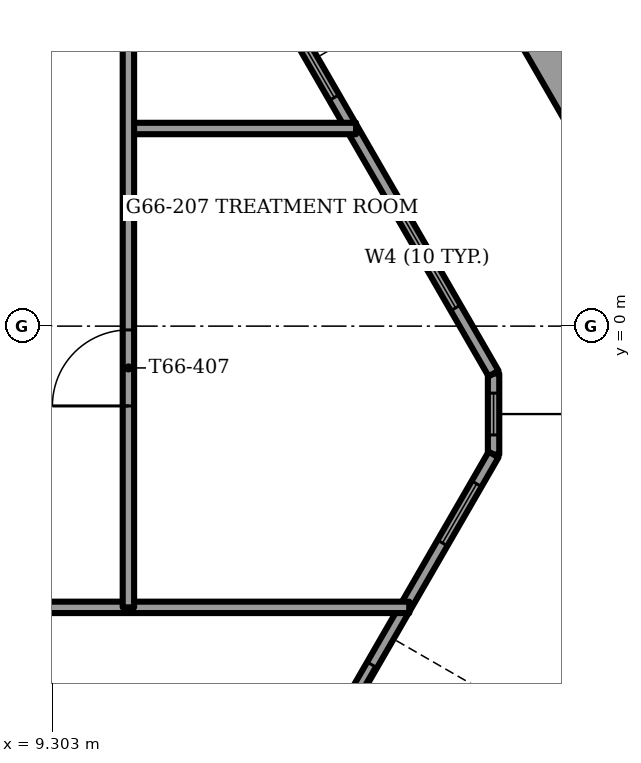
"""IFC4 building model, lengths in metres.
Left out: names, types, materials, properties, quantities, classifications, styles, units other than length and angle.
Written with IfcOpenShell. Run it as: python <this file> out.ifc"""

import sys

from ifc_helpers import new_model, si_unit, direction, frame, frame_2d, origin, place, context, subcontext, project, spatial, rectangle, extrude, element, fill, save


model = new_model("IFC4")
c1 = context("Model", 3, precision=1e-05, world=origin(), true_north=direction((0.0, 1.0)))
c2 = subcontext(c1, "Body", "Model", "MODEL_VIEW")
j1 = project(units=[si_unit("LENGTHUNIT", "METRE"), si_unit("PLANEANGLEUNIT", "RADIAN")], contexts=[c1])
p1 = place(None, origin())
s1 = spatial("IfcSite", under=j1, at=p1, CompositionType="ELEMENT")
p2 = place(p1, origin())
s2 = spatial("IfcBuilding", under=s1, at=p2, CompositionType="ELEMENT")
p3 = place(p2, frame((0.0, 0.0, 267.5)))
s3 = spatial("IfcBuildingStorey", under=s2, at=p3, CompositionType="ELEMENT", Elevation=267.5)
p4 = place(p3, frame((18.545, -0.735, 0.0), z_axis=(0.0, 0.0, 1.0), x_axis=(-0.499984362083, 0.866034432152, 0.0)))
e1 = element("IfcWall", 1, at=p4, inside=s3, PredefinedType="PARAPET", context=c2, shape_type="SweptSolid", body=[
    extrude(rectangle(XDim=6.159, YDim=0.9, at=frame_2d((3.08, 0.0))), origin(), (0.0, 0.0, 1.0), 1.1),
])
p5 = place(p3, frame((9.015, -12.236, 0.0), z_axis=(0.0, 0.0, 1.0), x_axis=(0.499998361514, 0.866026349763, 0.0)))
e2 = element("IfcWall", 2, at=p5, inside=s3, PredefinedType="SOLIDWALL", context=c2, shape_type="SweptSolid", body=[
    extrude(rectangle(XDim=12.179, YDim=0.15, at=frame_2d((6.089, 0.0))), origin(), (0.0, 0.0, 1.0), 3.45),
])
p6 = place(p5, frame((2.189, 0.0, 0.15)))
e3 = element("IfcOpeningElement", 3, at=p6, cuts=e2, PredefinedType="OPENING", context=c2, shape_type="SweptSolid", body=[
    extrude(rectangle(XDim=1.5, YDim=2.85, at=frame_2d((0.75, 1.425))), frame((0.0, 0.075, 0.0), z_axis=(0.0, -1.0, 0.0), x_axis=(1.0, 0.0, 0.0)), (0.0, 0.0, 1.0), 0.15),
])
p7 = place(p5, frame((4.389, 0.0, 0.0)))
e4 = element("IfcOpeningElement", 4, at=p7, cuts=e2, PredefinedType="OPENING", context=c2, shape_type="SweptSolid", body=[
    extrude(rectangle(XDim=1.4, YDim=2.4, at=frame_2d((0.7, 1.2))), frame((0.0, 0.075, 0.0), z_axis=(0.0, -1.0, 0.0), x_axis=(1.0, 0.0, 0.0)), (0.0, 0.0, 1.0), 0.15),
])
p8 = place(p5, frame((6.389, 0.0, 0.15)))
e5 = element("IfcOpeningElement", 5, at=p8, cuts=e2, PredefinedType="OPENING", context=c2, shape_type="SweptSolid", body=[
    extrude(rectangle(XDim=0.9, YDim=2.85, at=frame_2d((0.45, 1.425))), frame((0.0, 0.075, 0.0), z_axis=(0.0, -1.0, 0.0), x_axis=(1.0, 0.0, 0.0)), (0.0, 0.0, 1.0), 0.15),
])
p9 = place(p5, frame((7.583, 0.0, 0.0)))
e6 = element("IfcOpeningElement", 6, at=p9, cuts=e2, PredefinedType="OPENING", context=c2, shape_type="SweptSolid", body=[
    extrude(rectangle(XDim=1.4, YDim=2.4, at=frame_2d((0.7, 1.2))), frame((0.0, 0.075, 0.0), z_axis=(0.0, -1.0, 0.0), x_axis=(1.0, 0.0, 0.0)), (0.0, 0.0, 1.0), 0.15),
])
p10 = place(p5, frame((10.834, 0.0, 0.15)))
e7 = element("IfcOpeningElement", 7, at=p10, cuts=e2, PredefinedType="OPENING", context=c2, shape_type="SweptSolid", body=[
    extrude(rectangle(XDim=0.9, YDim=2.73, at=frame_2d((0.45, 1.365))), frame((0.0, 0.075, 0.0), z_axis=(0.0, -1.0, 0.0), x_axis=(1.0, 0.0, 0.0)), (0.0, 0.0, 1.0), 0.15),
])
p11 = place(p3, frame((15.104, -0.624, 0.0), z_axis=(0.0, 0.0, 1.0), x_axis=(-0.499998195608, 0.866026445548, 0.0)))
e8 = element("IfcWall", 8, at=p11, inside=s3, PredefinedType="SOLIDWALL", context=c2, shape_type="SweptSolid", body=[
    extrude(rectangle(XDim=18.956, YDim=0.15, at=frame_2d((9.478, 0.0))), origin(), (0.0, 0.0, 1.0), 3.45),
])
p12 = place(p11, frame((4.192, 0.0, 0.15)))
e9 = element("IfcOpeningElement", 9, at=p12, cuts=e8, PredefinedType="OPENING", context=c2, shape_type="SweptSolid", body=[
    extrude(rectangle(XDim=1.5, YDim=2.85, at=frame_2d((0.75, 1.425))), frame((0.0, 0.075, 0.0), z_axis=(0.0, -1.0, 0.0), x_axis=(1.0, 0.0, 0.0)), (0.0, 0.0, 1.0), 0.15),
])
p13 = place(p11, frame((6.392, 0.0, 0.15)))
e10 = element("IfcOpeningElement", 10, at=p13, cuts=e8, PredefinedType="OPENING", context=c2, shape_type="SweptSolid", body=[
    extrude(rectangle(XDim=1.4, YDim=2.85, at=frame_2d((0.7, 1.425))), frame((0.0, 0.075, 0.0), z_axis=(0.0, -1.0, 0.0), x_axis=(1.0, 0.0, 0.0)), (0.0, 0.0, 1.0), 0.15),
])
p14 = place(p11, frame((8.392, 0.0, 0.15)))
e11 = element("IfcOpeningElement", 11, at=p14, cuts=e8, PredefinedType="OPENING", context=c2, shape_type="SweptSolid", body=[
    extrude(rectangle(XDim=0.9, YDim=2.85, at=frame_2d((0.45, 1.425))), frame((0.0, 0.075, 0.0), z_axis=(0.0, -1.0, 0.0), x_axis=(1.0, 0.0, 0.0)), (0.0, 0.0, 1.0), 0.15),
])
p15 = place(p11, frame((10.592, 0.0, 0.15)))
e12 = element("IfcOpeningElement", 12, at=p15, cuts=e8, PredefinedType="OPENING", context=c2, shape_type="SweptSolid", body=[
    extrude(rectangle(XDim=1.4, YDim=2.85, at=frame_2d((0.7, 1.425))), frame((0.0, 0.075, 0.0), z_axis=(0.0, -1.0, 0.0), x_axis=(1.0, 0.0, 0.0)), (0.0, 0.0, 1.0), 0.15),
])
p16 = place(p11, frame((14.168, 0.0, 0.0)))
e13 = element("IfcOpeningElement", 13, at=p16, cuts=e8, PredefinedType="OPENING", context=c2, shape_type="SweptSolid", body=[
    extrude(rectangle(XDim=1.4, YDim=2.4, at=frame_2d((0.7, 1.2))), frame((0.0, 0.075, 0.0), z_axis=(0.0, -1.0, 0.0), x_axis=(1.0, 0.0, 0.0)), (0.0, 0.0, 1.0), 0.15),
])
p17 = place(p11, frame((0.998, 0.0, 0.15)))
e14 = element("IfcOpeningElement", 14, at=p17, cuts=e8, PredefinedType="OPENING", context=c2, shape_type="SweptSolid", body=[
    extrude(rectangle(XDim=1.5, YDim=2.73, at=frame_2d((0.75, 1.365))), frame((0.0, 0.075, 0.0), z_axis=(0.0, -1.0, 0.0), x_axis=(1.0, 0.0, 0.0)), (0.0, 0.0, 1.0), 0.15),
])
p18 = place(p11, frame((17.062, 0.0, 0.15)))
e15 = element("IfcOpeningElement", 15, at=p18, cuts=e8, PredefinedType="OPENING", context=c2, shape_type="SweptSolid", body=[
    extrude(rectangle(XDim=1.5, YDim=2.73, at=frame_2d((0.75, 1.365))), frame((0.0, 0.075, 0.0), z_axis=(0.0, -1.0, 0.0), x_axis=(1.0, 0.0, 0.0)), (0.0, 0.0, 1.0), 0.15),
])
p19 = place(p3, frame((15.104, -1.689, 0.0), z_axis=(0.0, 0.0, 1.0), x_axis=(0.0, 1.0, 0.0)))
e16 = element("IfcWall", 16, at=p19, inside=s3, PredefinedType="SOLIDWALL", context=c2, shape_type="SweptSolid", body=[
    extrude(rectangle(XDim=1.065, YDim=0.15, at=frame_2d((0.532, 0.0))), origin(), (0.0, 0.0, 1.0), 3.45),
])
p20 = place(p19, frame((0.258, 0.0, 0.15)))
e17 = element("IfcOpeningElement", 17, at=p20, cuts=e16, PredefinedType="OPENING", context=c2, shape_type="SweptSolid", body=[
    extrude(rectangle(XDim=0.55, YDim=2.85, at=frame_2d((0.275, 1.425))), frame((0.0, 0.075, 0.0), z_axis=(0.0, -1.0, 0.0), x_axis=(1.0, 0.0, 0.0)), (0.0, 0.0, 1.0), 0.15),
])
p21 = place(p3, frame((9.16, -3.7, 0.0), z_axis=(0.0, 0.0, 1.0), x_axis=(1.0, 0.0, 0.0)))
e18 = element("IfcWall", 18, at=p21, inside=s3, PredefinedType="PARTITIONING", context=c2, shape_type="SweptSolid", body=[
    extrude(rectangle(XDim=4.835, YDim=0.15, at=frame_2d((2.417, 0.0))), origin(), (0.0, 0.0, 1.0), 3.45),
])
p22 = place(p3, frame((10.3, 2.6, 0.0), z_axis=(0.0, 0.0, 1.0), x_axis=(1.0, 0.0, 0.0)))
e19 = element("IfcWall", 19, at=p22, inside=s3, PredefinedType="PARTITIONING", context=c2, shape_type="SweptSolid", body=[
    extrude(rectangle(XDim=2.995, YDim=0.15, at=frame_2d((1.498, 0.0))), origin(), (0.0, 0.0, 1.0), 3.45),
])
p23 = place(p3, frame((10.3, -3.7, 0.0), z_axis=(0.0, 0.0, 1.0), x_axis=(0.0, 1.0, 0.0)))
e20 = element("IfcWall", 20, at=p23, inside=s3, PredefinedType="PARTITIONING", context=c2, shape_type="SweptSolid", body=[
    extrude(rectangle(XDim=11.487, YDim=0.15, at=frame_2d((5.744, 0.0))), origin(), (0.0, 0.0, 1.0), 3.45),
])
p24 = place(p23, frame((2.65, 0.0, 0.0)))
e21 = element("IfcOpeningElement", 21, at=p24, cuts=e20, PredefinedType="OPENING", context=c2, shape_type="SweptSolid", body=[
    extrude(rectangle(XDim=1.0, YDim=2.1, at=frame_2d((0.5, 1.05))), frame((0.0, 0.075, 0.0), z_axis=(0.0, -1.0, 0.0), x_axis=(1.0, 0.0, 0.0)), (0.0, 0.0, 1.0), 0.15),
])
p25 = place(p23, frame((8.273, 0.0, 0.0)))
e22 = element("IfcOpeningElement", 22, at=p25, cuts=e20, PredefinedType="OPENING", context=c2, shape_type="SweptSolid", body=[
    extrude(rectangle(XDim=1.0, YDim=2.1, at=frame_2d((0.5, 1.05))), frame((0.0, 0.075, 0.0), z_axis=(0.0, -1.0, 0.0), x_axis=(1.0, 0.0, 0.0)), (0.0, 0.0, 1.0), 0.15),
])
p26 = place(p9, origin())
e23 = element("IfcDoor", 23, at=p26, inside=s3, OperationType="SLIDING_TO_RIGHT", PredefinedType="DOOR", context=c2, shape_type="SweptSolid", body=[
    extrude(rectangle(XDim=1.4, YDim=2.4, at=frame_2d((0.7, 1.2))), frame((0.0, 0.025, 0.0), z_axis=(0.0, -1.0, 0.0), x_axis=(1.0, 0.0, 0.0)), (0.0, 0.0, 1.0), 0.05),
])
fill(e6, e23)
p27 = place(p10, origin())
e24 = element("IfcWindow", 24, at=p27, inside=s3, PartitioningType="SINGLE_PANEL", PredefinedType="WINDOW", context=c2, shape_type="SweptSolid", body=[
    extrude(rectangle(XDim=0.9, YDim=2.73, at=frame_2d((0.45, 1.365))), frame((0.0, 0.03, 0.0), z_axis=(0.0, -1.0, 0.0), x_axis=(1.0, 0.0, 0.0)), (0.0, 0.0, 1.0), 0.06),
])
fill(e7, e24)
p28 = place(p12, origin())
e25 = element("IfcWindow", 25, at=p28, inside=s3, PartitioningType="SINGLE_PANEL", PredefinedType="WINDOW", context=c2, shape_type="SweptSolid", body=[
    extrude(rectangle(XDim=1.5, YDim=2.85, at=frame_2d((0.75, 1.425))), frame((0.0, 0.03, 0.0), z_axis=(0.0, -1.0, 0.0), x_axis=(1.0, 0.0, 0.0)), (0.0, 0.0, 1.0), 0.06),
])
fill(e9, e25)
p29 = place(p17, origin())
e26 = element("IfcWindow", 26, at=p29, inside=s3, PartitioningType="SINGLE_PANEL", PredefinedType="WINDOW", context=c2, shape_type="SweptSolid", body=[
    extrude(rectangle(XDim=1.5, YDim=2.73, at=frame_2d((0.75, 1.365))), frame((0.0, 0.03, 0.0), z_axis=(0.0, -1.0, 0.0), x_axis=(1.0, 0.0, 0.0)), (0.0, 0.0, 1.0), 0.06),
])
fill(e14, e26)
p30 = place(p20, origin())
e27 = element("IfcWindow", 27, at=p30, inside=s3, PartitioningType="SINGLE_PANEL", PredefinedType="WINDOW", context=c2, shape_type="SweptSolid", body=[
    extrude(rectangle(XDim=0.55, YDim=2.85, at=frame_2d((0.275, 1.425))), frame((0.0, 0.03, 0.0), z_axis=(0.0, -1.0, 0.0), x_axis=(1.0, 0.0, 0.0)), (0.0, 0.0, 1.0), 0.06),
])
fill(e17, e27)
p31 = place(p24, origin())
e28 = element("IfcDoor", 28, at=p31, inside=s3, OperationType="SINGLE_SWING_LEFT", PredefinedType="DOOR", context=c2, shape_type="SweptSolid", body=[
    extrude(rectangle(XDim=1.0, YDim=2.1, at=frame_2d((0.5, 1.05))), frame((0.0, 0.025, 0.0), z_axis=(0.0, -1.0, 0.0), x_axis=(1.0, 0.0, 0.0)), (0.0, 0.0, 1.0), 0.05),
])
fill(e21, e28)
save(model, sys.argv[1])
